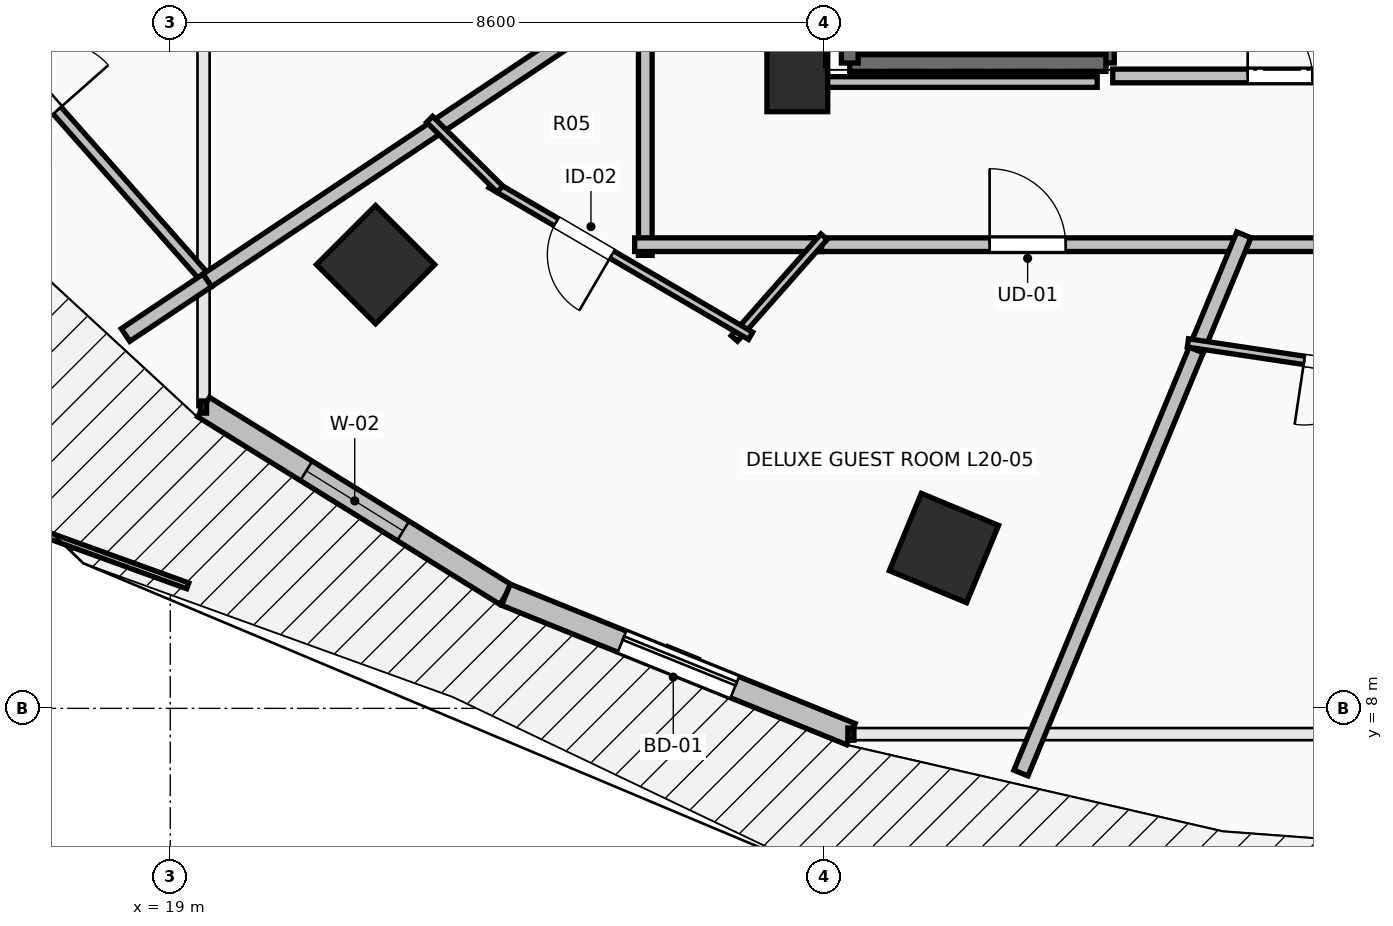
"""IFC4 building model, lengths in metres.
Left out: names, types, materials, properties, quantities, classifications, styles, units other than length and angle.
Written with IfcOpenShell. Run it as: python <this file> out.ifc"""

import sys

from ifc_helpers import new_model, si_unit, direction, frame, frame_2d, origin, origin_2d, place, context, subcontext, project, spatial, rectangle, extrude, element, fill, save


model = new_model("IFC4")
c1 = context("Model", 3, precision=1e-05, world=origin(), true_north=direction((0.0, 1.0)))
c2 = subcontext(c1, "Body", "Model", "MODEL_VIEW")
j1 = project(units=[si_unit("LENGTHUNIT", "METRE"), si_unit("PLANEANGLEUNIT", "RADIAN")], contexts=[c1])
p1 = place(None, origin())
s1 = spatial("IfcSite", under=j1, at=p1, CompositionType="ELEMENT")
p2 = place(p1, origin())
s2 = spatial("IfcBuilding", under=s1, at=p2, CompositionType="ELEMENT")
p3 = place(p2, frame((0.0, 0.0, 78.8)))
s3 = spatial("IfcBuildingStorey", under=s2, at=p3, CompositionType="ELEMENT", Elevation=78.8)
for number, where, z_axis, x_axis in (
    (1, (21.701, 13.838, 0.0), (0.0, 0.0, 1.0), (-0.707, -0.707, 0.0)),
    (2, (29.179, 10.109, 0.0), (0.0, 0.0, 1.0), (-0.383, -0.924, 0.0)),
):
    element("IfcColumn", number, at=place(p3, frame(where, z_axis=z_axis, x_axis=x_axis)), inside=s3, PredefinedType="COLUMN", context=c2, shape_type="SweptSolid", body=[
        extrude(rectangle(XDim=1.1, YDim=1.1, at=origin_2d()), origin(), (0.0, 0.0, 1.0), 3.5),
    ])
p4 = place(p3, frame((27.25, 16.45, 0.0), z_axis=(0.0, 0.0, 1.0), x_axis=(1.0, 0.0, 0.0)))
e3 = element("IfcColumn", 3, at=p4, inside=s3, PredefinedType="PILASTER", context=c2, shape_type="SweptSolid", body=[
    extrude(rectangle(XDim=0.8, YDim=1.2, at=origin_2d()), origin(), (0.0, 0.0, 1.0), 3.5),
])
p5 = place(p3, frame((19.438, 11.964, 0.0), z_axis=(0.0, 0.0, 1.0), x_axis=(0.849684479743, -0.527291461038, 0.0)))
e4 = element("IfcWall", 4, at=p5, inside=s3, PredefinedType="STANDARD", context=c2, shape_type="SweptSolid", body=[
    extrude(rectangle(XDim=4.681, YDim=0.3, at=frame_2d((2.341, 0.0))), origin(), (0.0, 0.0, 1.0), 3.24),
])
p6 = place(p5, frame((1.591, 0.0, 0.85)))
e5 = element("IfcOpeningElement", 5, at=p6, cuts=e4, PredefinedType="OPENING", context=c2, shape_type="SweptSolid", body=[
    extrude(rectangle(XDim=1.5, YDim=2.19, at=frame_2d((0.75, 1.095))), frame((0.0, 0.165, 0.0), z_axis=(0.0, -1.0, 0.0), x_axis=(1.0, 0.0, 0.0)), (0.0, 0.0, 1.0), 0.33),
])
p7 = place(p3, frame((23.416, 9.495, 0.0), z_axis=(0.0, 0.0, 1.0), x_axis=(0.927122233109, -0.374759075775, 0.0)))
e6 = element("IfcWall", 6, at=p7, inside=s3, PredefinedType="STANDARD", context=c2, shape_type="SweptSolid", body=[
    extrude(rectangle(XDim=4.895, YDim=0.3, at=frame_2d((2.448, 0.0))), origin(), (0.0, 0.0, 1.0), 3.24),
])
p8 = place(p7, frame((1.647, 0.0, 0.0)))
e7 = element("IfcOpeningElement", 7, at=p8, cuts=e6, PredefinedType="OPENING", context=c2, shape_type="SweptSolid", body=[
    extrude(rectangle(XDim=1.6, YDim=2.3, at=frame_2d((0.8, 1.15))), frame((0.0, 0.165, 0.0), z_axis=(0.0, -1.0, 0.0), x_axis=(1.0, 0.0, 0.0)), (0.0, 0.0, 1.0), 0.33),
])
p9 = place(p3, frame((31.31, 23.91, 0.0), z_axis=(0.0, 0.0, 1.0), x_axis=(0.0, -1.0, 0.0)))
e8 = element("IfcWall", 8, at=p9, inside=s3, PredefinedType="SOLIDWALL", context=c2, shape_type="SweptSolid", body=[
    extrude(rectangle(XDim=7.42, YDim=0.22, at=frame_2d((3.71, 0.0))), origin(), (0.0, 0.0, 1.0), 3.24),
])
p10 = place(p3, frame((31.31, 16.49, 0.0), z_axis=(0.0, 0.0, 1.0), x_axis=(-1.0, 0.0, 0.0)))
e9 = element("IfcWall", 9, at=p10, inside=s3, PredefinedType="SOLIDWALL", context=c2, shape_type="SweptSolid", body=[
    extrude(rectangle(XDim=3.37, YDim=0.22, at=frame_2d((1.685, 0.0))), origin(), (0.0, 0.0, 1.0), 3.24),
])
p11 = place(p3, frame((27.94, 16.49, 0.0), z_axis=(0.0, 0.0, 1.0), x_axis=(0.0, 1.0, 0.0)))
e10 = element("IfcWall", 10, at=p11, inside=s3, PredefinedType="SOLIDWALL", context=c2, shape_type="SweptSolid", body=[
    extrude(rectangle(XDim=7.42, YDim=0.22, at=frame_2d((3.71, 0.0))), origin(), (0.0, 0.0, 1.0), 3.24),
])
p12 = place(p3, frame((31.4, 16.32, 0.0), z_axis=(0.0, 0.0, 1.0), x_axis=(1.0, 0.0, 0.0)))
e11 = element("IfcWall", 11, at=p12, inside=s3, PredefinedType="PARTITIONING", context=c2, shape_type="SweptSolid", body=[
    extrude(rectangle(XDim=4.4, YDim=0.18, at=frame_2d((2.2, 0.0))), origin(), (0.0, 0.0, 1.0), 3.24),
])
p13 = place(p12, frame((1.775, 0.0, 0.0)))
e12 = element("IfcOpeningElement", 12, at=p13, cuts=e11, PredefinedType="OPENING", context=c2, shape_type="SweptSolid", body=[
    extrude(rectangle(XDim=0.85, YDim=2.1, at=frame_2d((0.425, 1.05))), frame((0.0, 0.105, 0.0), z_axis=(0.0, -1.0, 0.0), x_axis=(1.0, 0.0, 0.0)), (0.0, 0.0, 1.0), 0.21),
])
p14 = place(p3, frame((27.429, 14.1, 0.0), z_axis=(0.0, 0.0, 1.0), x_axis=(1.0, 0.0, 0.0)))
e13 = element("IfcWall", 13, at=p14, inside=s3, PredefinedType="PARTITIONING", context=c2, shape_type="SweptSolid", body=[
    extrude(rectangle(XDim=5.702, YDim=0.18, at=frame_2d((2.851, 0.0))), origin(), (0.0, 0.0, 1.0), 2.432),
])
p15 = place(p14, frame((2.351, 0.0, 0.0)))
e14 = element("IfcOpeningElement", 14, at=p15, cuts=e13, PredefinedType="OPENING", context=c2, shape_type="SweptSolid", body=[
    extrude(rectangle(XDim=1.0, YDim=2.15, at=frame_2d((0.5, 1.075))), frame((0.0, 0.105, 0.0), z_axis=(0.0, -1.0, 0.0), x_axis=(1.0, 0.0, 0.0)), (0.0, 0.0, 1.0), 0.21),
])
p16 = place(p3, frame((25.25, 17.549, 0.0), z_axis=(0.0, 0.0, 1.0), x_axis=(0.0, -1.0, 0.0)))
e15 = element("IfcWall", 15, at=p16, inside=s3, PredefinedType="PARTITIONING", context=c2, shape_type="SweptSolid", body=[
    extrude(rectangle(XDim=3.589, YDim=0.18, at=frame_2d((1.794, 0.0))), origin(), (0.0, 0.0, 1.0), 2.432),
])
p17 = place(p3, frame((25.11, 14.1, 0.0), z_axis=(0.0, 0.0, 1.0), x_axis=(1.0, 0.0, 0.0)))
e16 = element("IfcWall", 16, at=p17, inside=s3, PredefinedType="PARTITIONING", context=c2, shape_type="SweptSolid", body=[
    extrude(rectangle(XDim=2.459, YDim=0.18, at=frame_2d((1.229, 0.0))), origin(), (0.0, 0.0, 1.0), 2.874),
])
p18 = place(p3, frame((32.991, 14.1, 0.0), z_axis=(0.0, 0.0, 1.0), x_axis=(1.0, 0.0, 0.0)))
e17 = element("IfcWall", 17, at=p18, inside=s3, PredefinedType="PARTITIONING", context=c2, shape_type="SweptSolid", body=[
    extrude(rectangle(XDim=3.49, YDim=0.18, at=frame_2d((1.745, 0.0))), origin(), (0.0, 0.0, 1.0), 2.922),
])
p19 = place(p3, frame((14.94, 18.776, 0.0), z_axis=(0.0, 0.0, 1.0), x_axis=(0.662156478246, -0.749365597233, 0.0)))
e18 = element("IfcWall", 18, at=p19, inside=s3, PredefinedType="PARTITIONING", context=c2, shape_type="SweptSolid", body=[
    extrude(rectangle(XDim=6.867, YDim=0.14, at=frame_2d((3.434, 0.0))), origin(), (0.0, 0.0, 1.0), 3.24),
])
p20 = place(p19, frame((2.983, 0.0, 0.0)))
e19 = element("IfcOpeningElement", 19, at=p20, cuts=e18, PredefinedType="OPENING", context=c2, shape_type="SweptSolid", body=[
    extrude(rectangle(XDim=0.9, YDim=2.1, at=frame_2d((0.45, 1.05))), frame((0.0, 0.085, 0.0), z_axis=(0.0, -1.0, 0.0), x_axis=(1.0, 0.0, 0.0)), (0.0, 0.0, 1.0), 0.17),
])
p21 = place(p3, frame((19.487, 13.63, 0.0), z_axis=(0.0, 0.0, 1.0), x_axis=(0.831442874018, 0.555610247607, 0.0)))
e20 = element("IfcWall", 20, at=p21, inside=s3, PredefinedType="PARTITIONING", context=c2, shape_type="SweptSolid", body=[
    extrude(rectangle(XDim=6.931, YDim=0.2, at=frame_2d((3.466, 0.0))), origin(), (0.0, 0.0, 1.0), 2.432),
])
p22 = place(p3, frame((18.412, 12.912, 0.0), z_axis=(0.0, 0.0, 1.0), x_axis=(0.831643249848, 0.555310278118, 0.0)))
e21 = element("IfcWall", 21, at=p22, inside=s3, PredefinedType="PARTITIONING", context=c2, shape_type="SweptSolid", body=[
    extrude(rectangle(XDim=1.292, YDim=0.2, at=frame_2d((0.646, 0.0))), origin(), (0.0, 0.0, 1.0), 3.24),
])
p23 = place(p3, frame((27.602, 14.205, 0.0), z_axis=(0.0, 0.0, 1.0), x_axis=(-0.661454172329, -0.749985585134, 0.0)))
e22 = element("IfcWall", 22, at=p23, inside=s3, PredefinedType="PARTITIONING", context=c2, shape_type="SweptSolid", body=[
    extrude(rectangle(XDim=1.784, YDim=0.11, at=frame_2d((0.892, 0.0))), origin(), (0.0, 0.0, 1.0), 2.874),
])
p24 = place(p3, frame((26.635, 12.901, 0.0), z_axis=(0.0, 0.0, 1.0), x_axis=(-0.863173900656, 0.504906741117, 0.0)))
e23 = element("IfcWall", 23, at=p24, inside=s3, PredefinedType="PARTITIONING", context=c2, shape_type="SweptSolid", body=[
    extrude(rectangle(XDim=3.956, YDim=0.11, at=frame_2d((1.978, 0.0))), origin(), (0.0, 0.0, 1.0), 2.432),
])
p25 = place(p24, frame((2.113, 0.0, 0.0)))
e24 = element("IfcOpeningElement", 24, at=p25, cuts=e23, PredefinedType="OPENING", context=c2, shape_type="SweptSolid", body=[
    extrude(rectangle(XDim=0.85, YDim=2.1, at=frame_2d((0.425, 1.05))), frame((0.0, 0.07, 0.0), z_axis=(0.0, -1.0, 0.0), x_axis=(1.0, 0.0, 0.0)), (0.0, 0.0, 1.0), 0.14),
])
p26 = place(p3, frame((23.338, 14.831, 0.0), z_axis=(0.0, 0.0, 1.0), x_axis=(-0.709817225963, 0.70438590682, 0.0)))
e25 = element("IfcWall", 25, at=p26, inside=s3, PredefinedType="PARTITIONING", context=c2, shape_type="SweptSolid", body=[
    extrude(rectangle(XDim=1.303, YDim=0.11, at=frame_2d((0.652, 0.0))), origin(), (0.0, 0.0, 1.0), 2.432),
])
p27 = place(p3, frame((30.192, 7.149, 0.0), z_axis=(0.0, 0.0, 1.0), x_axis=(0.382705075352, 0.923870567395, 0.0)))
e26 = element("IfcWall", 26, at=p27, inside=s3, PredefinedType="PARTITIONING", context=c2, shape_type="SweptSolid", body=[
    extrude(rectangle(XDim=6.164, YDim=0.2, at=frame_2d((3.082, 0.0))), origin(), (0.0, 0.0, 1.0), 2.677),
])
p28 = place(p3, frame((32.497, 12.715, 0.0), z_axis=(0.0, 0.0, 1.0), x_axis=(0.382891039503, 0.923793511489, 0.0)))
e27 = element("IfcWall", 27, at=p28, inside=s3, PredefinedType="PARTITIONING", context=c2, shape_type="SweptSolid", body=[
    extrude(rectangle(XDim=1.639, YDim=0.2, at=frame_2d((0.82, 0.0))), origin(), (0.0, 0.0, 1.0), 2.922),
])
p29 = place(p3, frame((36.29, 12.221, 0.0), z_axis=(0.0, 0.0, 1.0), x_axis=(-0.988883185792, 0.148694468147, 0.0)))
e28 = element("IfcWall", 28, at=p29, inside=s3, PredefinedType="PARTITIONING", context=c2, shape_type="SweptSolid", body=[
    extrude(rectangle(XDim=3.946, YDim=0.11, at=frame_2d((1.973, 0.0))), origin(), (0.0, 0.0, 1.0), 3.24),
])
p30 = place(p29, frame((1.548, 0.0, 0.0)))
e29 = element("IfcOpeningElement", 29, at=p30, cuts=e28, PredefinedType="OPENING", context=c2, shape_type="SweptSolid", body=[
    extrude(rectangle(XDim=0.85, YDim=2.1, at=frame_2d((0.425, 1.05))), frame((0.0, 0.07, 0.0), z_axis=(0.0, -1.0, 0.0), x_axis=(1.0, 0.0, 0.0)), (0.0, 0.0, 1.0), 0.14),
])
p31 = place(p3, frame((31.195, 16.24, 0.0), z_axis=(0.0, 0.0, 1.0), x_axis=(-1.0, 0.0, 0.0)))
e30 = element("IfcWall", 30, at=p31, inside=s3, PredefinedType="PARTITIONING", context=c2, shape_type="SweptSolid", body=[
    extrude(rectangle(XDim=3.745, YDim=0.14, at=frame_2d((1.873, 0.0))), origin(), (0.0, 0.0, 1.0), 2.432),
])
p32 = place(p3, frame((27.45, 16.24, 0.0), z_axis=(0.0, 0.0, 1.0), x_axis=(0.0, 1.0, 0.0)))
e31 = element("IfcWall", 31, at=p32, inside=s3, PredefinedType="PARTITIONING", context=c2, shape_type="SweptSolid", body=[
    extrude(rectangle(XDim=7.514, YDim=0.14, at=frame_2d((3.757, 0.0))), origin(), (0.0, 0.0, 1.0), 2.432),
])
p33 = place(p8, origin())
e32 = element("IfcDoor", 32, at=p33, inside=s3, OperationType="SLIDING_TO_LEFT", PredefinedType="DOOR", context=c2, shape_type="SweptSolid", body=[
    extrude(rectangle(XDim=1.6, YDim=2.3, at=frame_2d((0.8, 1.15))), frame((0.0, 0.025, 0.0), z_axis=(0.0, -1.0, 0.0), x_axis=(1.0, 0.0, 0.0)), (0.0, 0.0, 1.0), 0.05),
])
fill(e7, e32)
p34 = place(p6, origin())
e33 = element("IfcWindow", 33, at=p34, inside=s3, PartitioningType="SINGLE_PANEL", PredefinedType="WINDOW", context=c2, shape_type="SweptSolid", body=[
    extrude(rectangle(XDim=1.5, YDim=2.19, at=frame_2d((0.75, 1.095))), frame((0.0, 0.03, 0.0), z_axis=(0.0, -1.0, 0.0), x_axis=(1.0, 0.0, 0.0)), (0.0, 0.0, 1.0), 0.06),
])
fill(e5, e33)
p35 = place(p13, origin())
e34 = element("IfcDoor", 34, at=p35, inside=s3, OperationType="SINGLE_SWING_LEFT", PredefinedType="DOOR", context=c2, shape_type="SweptSolid", body=[
    extrude(rectangle(XDim=0.85, YDim=2.1, at=frame_2d((0.425, 1.05))), frame((0.0, 0.025, 0.0), z_axis=(0.0, -1.0, 0.0), x_axis=(1.0, 0.0, 0.0)), (0.0, 0.0, 1.0), 0.05),
])
fill(e12, e34)
p36 = place(p15, origin())
e35 = element("IfcDoor", 35, at=p36, inside=s3, OperationType="SINGLE_SWING_LEFT", PredefinedType="DOOR", context=c2, shape_type="SweptSolid", body=[
    extrude(rectangle(XDim=1.0, YDim=2.15, at=frame_2d((0.5, 1.075))), frame((0.0, 0.025, 0.0), z_axis=(0.0, -1.0, 0.0), x_axis=(1.0, 0.0, 0.0)), (0.0, 0.0, 1.0), 0.05),
])
fill(e14, e35)
p37 = place(p20, origin())
e36 = element("IfcDoor", 36, at=p37, inside=s3, OperationType="SINGLE_SWING_RIGHT", PredefinedType="DOOR", context=c2, shape_type="SweptSolid", body=[
    extrude(rectangle(XDim=0.9, YDim=2.1, at=frame_2d((0.45, 1.05))), frame((0.0, 0.025, 0.0), z_axis=(0.0, -1.0, 0.0), x_axis=(1.0, 0.0, 0.0)), (0.0, 0.0, 1.0), 0.05),
])
fill(e19, e36)
p38 = place(p25, origin())
e37 = element("IfcDoor", 37, at=p38, inside=s3, OperationType="SINGLE_SWING_LEFT", PredefinedType="DOOR", context=c2, shape_type="SweptSolid", body=[
    extrude(rectangle(XDim=0.85, YDim=2.1, at=frame_2d((0.425, 1.05))), frame((0.0, 0.025, 0.0), z_axis=(0.0, -1.0, 0.0), x_axis=(1.0, 0.0, 0.0)), (0.0, 0.0, 1.0), 0.05),
])
fill(e24, e37)
p39 = place(p30, origin())
e38 = element("IfcDoor", 38, at=p39, inside=s3, OperationType="SINGLE_SWING_RIGHT", PredefinedType="DOOR", context=c2, shape_type="SweptSolid", body=[
    extrude(rectangle(XDim=0.85, YDim=2.1, at=frame_2d((0.425, 1.05))), frame((0.0, 0.025, 0.0), z_axis=(0.0, -1.0, 0.0), x_axis=(1.0, 0.0, 0.0)), (0.0, 0.0, 1.0), 0.05),
])
fill(e29, e38)
save(model, sys.argv[1])
